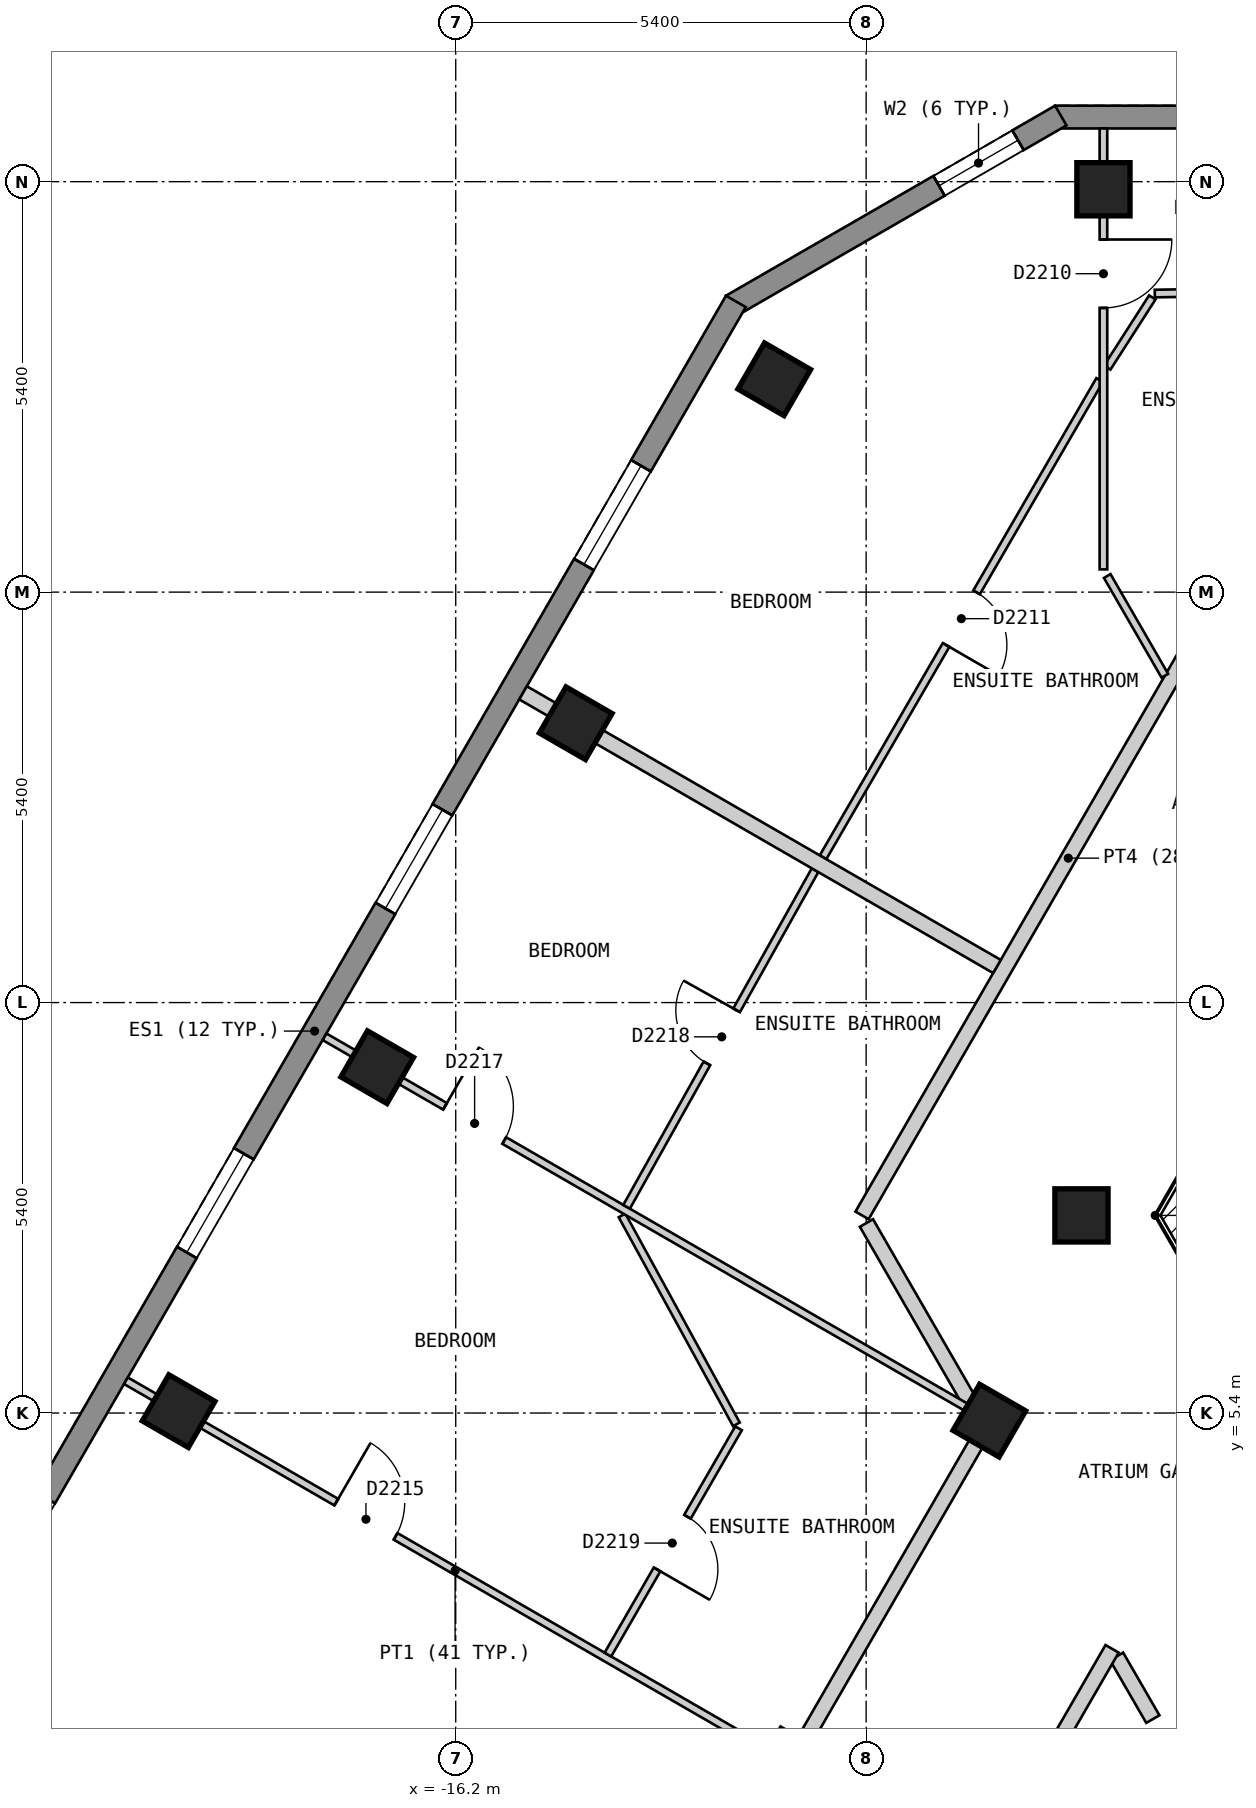
"""IFC4 building model, lengths in metres.
Left out: names, types, materials, properties, quantities, classifications, styles, units other than length and angle.
Written with IfcOpenShell. Run it as: python <this file> out.ifc"""

import sys

from ifc_helpers import new_model, si_unit, direction, frame, frame_2d, origin, origin_2d, place, context, subcontext, project, spatial, polyline, rectangle, outline, extrude, element, fill, save


model = new_model("IFC4")
c1 = context("Model", 3, precision=1e-05, world=origin(), true_north=direction((0.0, 1.0)))
c2 = subcontext(c1, "Body", "Model", "MODEL_VIEW")
j1 = project(units=[si_unit("LENGTHUNIT", "METRE"), si_unit("PLANEANGLEUNIT", "RADIAN")], contexts=[c1])
p1 = place(None, origin())
s1 = spatial("IfcSite", under=j1, at=p1, CompositionType="ELEMENT")
p2 = place(p1, origin())
s2 = spatial("IfcBuilding", under=s1, at=p2, CompositionType="ELEMENT")
p3 = place(p2, frame((0.0, 0.0, 235.8)))
s3 = spatial("IfcBuildingStorey", under=s2, at=p3, CompositionType="ELEMENT", Elevation=235.8)
for number, where, z_axis, x_axis in (
    (1, (-7.678, 21.5, 0.0), (0.0, 0.0, 1.0), (-1.0, 0.0, 0.0)),
    (2, (-12.009, 19.0, 0.0), (0.0, 0.0, 1.0), (-0.5, -0.866, 0.0)),
    (3, (-14.621, 14.475, 0.0), (0.0, 0.0, 1.0), (-0.5, -0.866, 0.0)),
    (4, (-17.233, 9.95, 0.0), (0.0, 0.0, 1.0), (-0.5, -0.866, 0.0)),
    (5, (-19.846, 5.425, 0.0), (0.0, 0.0, 1.0), (-0.5, -0.866, 0.0)),
    (6, (-7.967, 8.0, 0.0), (0.0, 0.0, 1.0), (1.0, 0.0, 0.0)),
    (7, (-9.179, 5.3, 0.0), (0.0, 0.0, 1.0), (-0.5, -0.866, 0.0)),
    (8, (-11.792, 0.775, 0.0), (0.0, 0.0, 1.0), (-0.5, -0.866, 0.0)),
):
    element("IfcColumn", number, at=place(p3, frame(where, z_axis=z_axis, x_axis=x_axis)), inside=s3, PredefinedType="COLUMN", context=c2, shape_type="SweptSolid", body=[
        extrude(rectangle(XDim=0.7, YDim=0.7, at=origin_2d()), origin(), (0.0, 0.0, 1.0), 3.0),
    ])
p4 = place(p3, frame((8.314, 22.45, 0.0), z_axis=(0.0, 0.0, 1.0), x_axis=(-1.0, 0.0, 0.0)))
e9 = element("IfcWall", 9, at=p4, inside=s3, PredefinedType="SOLIDWALL", context=c2, shape_type="SweptSolid", body=[
    extrude(outline(polyline([(0.0, -0.15), (16.628, -0.15), (16.548, 0.15), (0.08, 0.15), (0.0, -0.15)])), origin(), (0.0, 0.0, 1.0), 2.7),
])
p5 = place(p4, frame((2.444, 0.0, 0.15)))
e10 = element("IfcOpeningElement", 10, at=p5, cuts=e9, PredefinedType="OPENING", context=c2, shape_type="SweptSolid", body=[
    extrude(rectangle(XDim=1.5, YDim=2.1, at=frame_2d((0.75, 1.05))), frame((0.0, 0.16, 0.0), z_axis=(0.0, -1.0, 0.0), x_axis=(1.0, 0.0, 0.0)), (0.0, 0.0, 1.0), 0.32),
])
p6 = place(p4, frame((7.564, 0.0, 0.15)))
e11 = element("IfcOpeningElement", 11, at=p6, cuts=e9, PredefinedType="OPENING", context=c2, shape_type="SweptSolid", body=[
    extrude(rectangle(XDim=1.5, YDim=2.1, at=frame_2d((0.75, 1.05))), frame((0.0, 0.16, 0.0), z_axis=(0.0, -1.0, 0.0), x_axis=(1.0, 0.0, 0.0)), (0.0, 0.0, 1.0), 0.32),
])
p7 = place(p4, frame((12.683, 0.0, 0.15)))
e12 = element("IfcOpeningElement", 12, at=p7, cuts=e9, PredefinedType="OPENING", context=c2, shape_type="SweptSolid", body=[
    extrude(rectangle(XDim=1.5, YDim=2.1, at=frame_2d((0.75, 1.05))), frame((0.0, 0.16, 0.0), z_axis=(0.0, -1.0, 0.0), x_axis=(1.0, 0.0, 0.0)), (0.0, 0.0, 1.0), 0.32),
])
p8 = place(p3, frame((-8.239, 22.47, 0.0), z_axis=(0.0, 0.0, 1.0), x_axis=(-0.866022959057, -0.500004234368, 0.0)))
e13 = element("IfcWall", 13, at=p8, inside=s3, PredefinedType="SOLIDWALL", context=c2, shape_type="SweptSolid", body=[
    extrude(outline(polyline([(0.0, -0.15), (5.0, -0.15), (4.92, 0.15), (0.08, 0.15), (0.0, -0.15)])), origin(), (0.0, 0.0, 1.0), 2.7),
])
p9 = place(p8, frame((0.65, 0.0, 0.15)))
e14 = element("IfcOpeningElement", 14, at=p9, cuts=e13, PredefinedType="OPENING", context=c2, shape_type="SweptSolid", body=[
    extrude(rectangle(XDim=1.2, YDim=2.1, at=frame_2d((0.6, 1.05))), frame((0.0, 0.16, 0.0), z_axis=(0.0, -1.0, 0.0), x_axis=(1.0, 0.0, 0.0)), (0.0, 0.0, 1.0), 0.32),
])
p10 = place(p3, frame((-12.514, 20.025, 0.0), z_axis=(0.0, 0.0, 1.0), x_axis=(-0.500003656944, -0.866023292436, 0.0)))
e15 = element("IfcWall", 15, at=p10, inside=s3, PredefinedType="SOLIDWALL", context=c2, shape_type="SweptSolid", body=[
    extrude(outline(polyline([(0.0, -0.15), (22.17, -0.15), (22.09, 0.15), (0.08, 0.15), (0.0, -0.15)])), origin(), (0.0, 0.0, 1.0), 2.7),
])
p11 = place(p10, frame((2.497, 0.0, 0.15)))
e16 = element("IfcOpeningElement", 16, at=p11, cuts=e15, PredefinedType="OPENING", context=c2, shape_type="SweptSolid", body=[
    extrude(rectangle(XDim=1.5, YDim=2.1, at=frame_2d((0.75, 1.05))), frame((0.0, 0.16, 0.0), z_axis=(0.0, -1.0, 0.0), x_axis=(1.0, 0.0, 0.0)), (0.0, 0.0, 1.0), 0.32),
])
p12 = place(p10, frame((7.722, 0.0, 0.15)))
e17 = element("IfcOpeningElement", 17, at=p12, cuts=e15, PredefinedType="OPENING", context=c2, shape_type="SweptSolid", body=[
    extrude(rectangle(XDim=1.5, YDim=2.1, at=frame_2d((0.75, 1.05))), frame((0.0, 0.16, 0.0), z_axis=(0.0, -1.0, 0.0), x_axis=(1.0, 0.0, 0.0)), (0.0, 0.0, 1.0), 0.32),
])
p13 = place(p10, frame((12.948, 0.0, 0.15)))
e18 = element("IfcOpeningElement", 18, at=p13, cuts=e15, PredefinedType="OPENING", context=c2, shape_type="SweptSolid", body=[
    extrude(rectangle(XDim=1.5, YDim=2.1, at=frame_2d((0.75, 1.05))), frame((0.0, 0.16, 0.0), z_axis=(0.0, -1.0, 0.0), x_axis=(1.0, 0.0, 0.0)), (0.0, 0.0, 1.0), 0.32),
])
p14 = place(p10, frame((18.173, 0.0, 0.15)))
e19 = element("IfcOpeningElement", 19, at=p14, cuts=e15, PredefinedType="OPENING", context=c2, shape_type="SweptSolid", body=[
    extrude(rectangle(XDim=1.5, YDim=2.1, at=frame_2d((0.75, 1.05))), frame((0.0, 0.16, 0.0), z_axis=(0.0, -1.0, 0.0), x_axis=(1.0, 0.0, 0.0)), (0.0, 0.0, 1.0), 0.32),
])
p15 = place(p3, frame((-10.796, 7.9, 0.0), z_axis=(0.0, 0.0, 1.0), x_axis=(0.499674397761, -0.866213308731, 0.0)))
e20 = element("IfcWall", 20, at=p15, inside=s3, PredefinedType="PARTITIONING", context=c2, shape_type="SweptSolid", body=[
    extrude(rectangle(XDim=2.785, YDim=0.2, at=frame_2d((1.393, 0.0))), origin(), (0.0, 0.0, 1.0), 2.7),
])
p16 = place(p3, frame((-7.505, 2.198, 0.0), z_axis=(0.0, 0.0, 1.0), x_axis=(0.500409926597, -0.865788603161, 0.0)))
e21 = element("IfcWall", 21, at=p16, inside=s3, PredefinedType="PARTITIONING", context=c2, shape_type="SweptSolid", body=[
    extrude(rectangle(XDim=0.953, YDim=0.2, at=frame_2d((0.477, 0.0))), origin(), (0.0, 0.0, 1.0), 2.7),
])
p17 = place(p3, frame((-9.815, -1.6, 0.0), z_axis=(0.0, 0.0, 1.0), x_axis=(0.500058909736, 0.865991389561, 0.0)))
e22 = element("IfcWall", 22, at=p17, inside=s3, PredefinedType="PARTITIONING", context=c2, shape_type="SweptSolid", body=[
    extrude(rectangle(XDim=4.501, YDim=0.2, at=frame_2d((2.251, 0.0))), origin(), (0.0, 0.0, 1.0), 2.7),
])
p18 = place(p17, frame((1.801, 0.0, 0.0)))
e23 = element("IfcOpeningElement", 23, at=p18, cuts=e22, PredefinedType="OPENING", context=c2, shape_type="SweptSolid", body=[
    extrude(rectangle(XDim=0.9, YDim=2.1, at=frame_2d((0.45, 1.05))), frame((0.0, 0.11, 0.0), z_axis=(0.0, -1.0, 0.0), x_axis=(1.0, 0.0, 0.0)), (0.0, 0.0, 1.0), 0.22),
])
p19 = place(p3, frame((-13.106, -1.5, 0.0), z_axis=(0.0, 0.0, 1.0), x_axis=(0.500025705601, 0.86601056214, 0.0)))
e24 = element("IfcWall", 24, at=p19, inside=s3, PredefinedType="PARTITIONING", context=c2, shape_type="SweptSolid", body=[
    extrude(rectangle(XDim=7.735, YDim=0.2, at=frame_2d((3.868, 0.0))), origin(), (0.0, 0.0, 1.0), 2.7),
])
p20 = place(p3, frame((-10.854, 8.0, 0.0), z_axis=(0.0, 0.0, 1.0), x_axis=(0.499997637144, 0.866026767976, 0.0)))
e25 = element("IfcWall", 25, at=p20, inside=s3, PredefinedType="PARTITIONING", context=c2, shape_type="SweptSolid", body=[
    extrude(rectangle(XDim=10.854, YDim=0.2, at=frame_2d((5.427, 0.0))), origin(), (0.0, 0.0, 1.0), 2.7),
])
p21 = place(p3, frame((-7.628, 16.412, 0.0), z_axis=(0.0, 0.0, 1.0), x_axis=(0.500159472144, -0.86593331292, 0.0)))
e26 = element("IfcWall", 26, at=p21, inside=s3, PredefinedType="PARTITIONING", context=c2, shape_type="SweptSolid", body=[
    extrude(rectangle(XDim=1.515, YDim=0.1, at=frame_2d((0.758, 0.0))), origin(), (0.0, 0.0, 1.0), 2.7),
])
p22 = place(p3, frame((-14.012, 8.0, 0.0), z_axis=(0.0, 0.0, 1.0), x_axis=(0.480183343847, -0.877168145963, 0.0)))
e27 = element("IfcWall", 27, at=p22, inside=s3, PredefinedType="PARTITIONING", context=c2, shape_type="SweptSolid", body=[
    extrude(rectangle(XDim=3.134, YDim=0.1, at=frame_2d((1.567, 0.0))), origin(), (0.0, 0.0, 1.0), 2.7),
])
p23 = place(p3, frame((-20.539, 5.825, 0.0), z_axis=(0.0, 0.0, 1.0), x_axis=(0.866089650643, -0.499888704662, 0.0)))
e28 = element("IfcWall", 28, at=p23, inside=s3, PredefinedType="PARTITIONING", context=c2, shape_type="SweptSolid", body=[
    extrude(rectangle(XDim=10.0, YDim=0.1, at=frame_2d((5.0, 0.0))), origin(), (0.0, 0.0, 1.0), 2.7),
])
p24 = place(p23, frame((3.196, 0.0, 0.0)))
e29 = element("IfcOpeningElement", 29, at=p24, cuts=e28, PredefinedType="OPENING", context=c2, shape_type="SweptSolid", body=[
    extrude(rectangle(XDim=0.9, YDim=2.1, at=frame_2d((0.45, 1.05))), frame((0.0, 0.06, 0.0), z_axis=(0.0, -1.0, 0.0), x_axis=(1.0, 0.0, 0.0)), (0.0, 0.0, 1.0), 0.12),
])
p25 = place(p3, frame((-17.926, 10.35, 0.0), z_axis=(0.0, 0.0, 1.0), x_axis=(0.866018411306, -0.500012111133, 0.0)))
e30 = element("IfcWall", 30, at=p25, inside=s3, PredefinedType="PARTITIONING", context=c2, shape_type="SweptSolid", body=[
    extrude(rectangle(XDim=9.898, YDim=0.1, at=frame_2d((4.949, 0.0))), origin(), (0.0, 0.0, 1.0), 2.7),
])
p26 = place(p25, frame((1.83, 0.0, 0.0)))
e31 = element("IfcOpeningElement", 31, at=p26, cuts=e30, PredefinedType="OPENING", context=c2, shape_type="SweptSolid", body=[
    extrude(rectangle(XDim=0.9, YDim=2.1, at=frame_2d((0.45, 1.05))), frame((0.0, 0.06, 0.0), z_axis=(0.0, -1.0, 0.0), x_axis=(1.0, 0.0, 0.0)), (0.0, 0.0, 1.0), 0.12),
])
p27 = place(p3, frame((-7.628, 19.154, 0.0), z_axis=(0.0, 0.0, 1.0), x_axis=(0.540600102017, 0.841279697663, 0.0)))
e32 = element("IfcWall", 32, at=p27, inside=s3, PredefinedType="PARTITIONING", context=c2, shape_type="SweptSolid", body=[
    extrude(rectangle(XDim=1.097, YDim=0.1, at=frame_2d((0.548, 0.0))), origin(), (0.0, 0.0, 1.0), 2.7),
])
p28 = place(p3, frame((-14.198, 2.222, 0.0), z_axis=(0.0, 0.0, 1.0), x_axis=(0.500042121486, 0.866001083567, 0.0)))
e33 = element("IfcWall", 33, at=p28, inside=s3, PredefinedType="PARTITIONING", context=c2, shape_type="SweptSolid", body=[
    extrude(rectangle(XDim=3.438, YDim=0.1, at=frame_2d((1.719, 0.0))), origin(), (0.0, 0.0, 1.0), 2.7),
])
p29 = place(p28, frame((1.294, 0.0, 0.0)))
e34 = element("IfcOpeningElement", 34, at=p29, cuts=e33, PredefinedType="OPENING", context=c2, shape_type="SweptSolid", body=[
    extrude(rectangle(XDim=0.8, YDim=2.1, at=frame_2d((0.4, 1.05))), frame((0.0, 0.06, 0.0), z_axis=(0.0, -1.0, 0.0), x_axis=(1.0, 0.0, 0.0)), (0.0, 0.0, 1.0), 0.12),
])
p30 = place(p3, frame((-11.367, 12.712, 0.0), z_axis=(0.0, 0.0, 1.0), x_axis=(0.501473866443, 0.865172792727, 0.0)))
e35 = element("IfcWall", 35, at=p30, inside=s3, PredefinedType="PARTITIONING", context=c2, shape_type="SweptSolid", body=[
    extrude(rectangle(XDim=7.256, YDim=0.1, at=frame_2d((3.628, 0.0))), origin(), (0.0, 0.0, 1.0), 2.7),
])
p31 = place(p30, frame((3.228, 0.0, 0.0)))
e36 = element("IfcOpeningElement", 36, at=p31, cuts=e35, PredefinedType="OPENING", context=c2, shape_type="SweptSolid", body=[
    extrude(rectangle(XDim=0.8, YDim=2.1, at=frame_2d((0.4, 1.05))), frame((0.0, 0.06, 0.0), z_axis=(0.0, -1.0, 0.0), x_axis=(1.0, 0.0, 0.0)), (0.0, 0.0, 1.0), 0.12),
])
p32 = place(p3, frame((-13.952, 8.113, 0.0), z_axis=(0.0, 0.0, 1.0), x_axis=(0.488568218554, 0.872525699231, 0.0)))
e37 = element("IfcWall", 37, at=p32, inside=s3, PredefinedType="PARTITIONING", context=c2, shape_type="SweptSolid", body=[
    extrude(rectangle(XDim=5.076, YDim=0.1, at=frame_2d((2.538, 0.0))), origin(), (0.0, 0.0, 1.0), 2.7),
])
p33 = place(p32, frame((2.163, 0.0, 0.0)))
e38 = element("IfcOpeningElement", 38, at=p33, cuts=e37, PredefinedType="OPENING", context=c2, shape_type="SweptSolid", body=[
    extrude(rectangle(XDim=0.8, YDim=2.1, at=frame_2d((0.4, 1.05))), frame((0.0, 0.06, 0.0), z_axis=(0.0, -1.0, 0.0), x_axis=(1.0, 0.0, 0.0)), (0.0, 0.0, 1.0), 0.12),
])
p34 = place(p3, frame((-7.678, 16.499, 0.0), z_axis=(0.0, 0.0, 1.0), x_axis=(0.0, 1.0, 0.0)))
e39 = element("IfcWall", 39, at=p34, inside=s3, PredefinedType="PARTITIONING", context=c2, shape_type="SweptSolid", body=[
    extrude(rectangle(XDim=5.801, YDim=0.1, at=frame_2d((2.9, 0.0))), origin(), (0.0, 0.0, 1.0), 2.7),
])
p35 = place(p34, frame((3.44, 0.0, 0.0)))
e40 = element("IfcOpeningElement", 40, at=p35, cuts=e39, PredefinedType="OPENING", context=c2, shape_type="SweptSolid", body=[
    extrude(rectangle(XDim=0.9, YDim=2.1, at=frame_2d((0.45, 1.05))), frame((0.0, 0.06, 0.0), z_axis=(0.0, -1.0, 0.0), x_axis=(1.0, 0.0, 0.0)), (0.0, 0.0, 1.0), 0.12),
])
p36 = place(p3, frame((-7.002, 20.128, 0.0), z_axis=(0.0, 0.0, 1.0), x_axis=(0.999868634558, 0.016208443081, 0.0)))
e41 = element("IfcWall", 41, at=p36, inside=s3, PredefinedType="PARTITIONING", context=c2, shape_type="SweptSolid", body=[
    extrude(rectangle(XDim=4.443, YDim=0.1, at=frame_2d((2.222, 0.0))), origin(), (0.0, 0.0, 1.0), 2.7),
])
p37 = place(p36, frame((1.475, 0.0, 0.0)))
e42 = element("IfcOpeningElement", 42, at=p37, cuts=e41, PredefinedType="OPENING", context=c2, shape_type="SweptSolid", body=[
    extrude(rectangle(XDim=0.8, YDim=2.1, at=frame_2d((0.4, 1.05))), frame((0.0, 0.06, 0.0), z_axis=(0.0, -1.0, 0.0), x_axis=(1.0, 0.0, 0.0)), (0.0, 0.0, 1.0), 0.12),
])
p38 = place(p3, frame((-15.314, 14.875, 0.0), z_axis=(0.0, 0.0, 1.0), x_axis=(0.866001485781, -0.500041424909, 0.0)))
e43 = element("IfcWall", 43, at=p38, inside=s3, PredefinedType="PARTITIONING", context=c2, shape_type="SweptSolid", body=[
    extrude(rectangle(XDim=7.2, YDim=0.2, at=frame_2d((3.6, 0.0))), origin(), (0.0, 0.0, 1.0), 2.7),
])
p39 = place(p9, origin())
e44 = element("IfcWindow", 44, at=p39, inside=s3, PartitioningType="SINGLE_PANEL", PredefinedType="WINDOW", context=c2, shape_type="SweptSolid", body=[
    extrude(rectangle(XDim=1.2, YDim=2.1, at=frame_2d((0.6, 1.05))), frame((0.0, 0.03, 0.0), z_axis=(0.0, -1.0, 0.0), x_axis=(1.0, 0.0, 0.0)), (0.0, 0.0, 1.0), 0.06),
])
fill(e14, e44)
p40 = place(p11, origin())
e45 = element("IfcWindow", 45, at=p40, inside=s3, PartitioningType="SINGLE_PANEL", PredefinedType="WINDOW", context=c2, shape_type="SweptSolid", body=[
    extrude(rectangle(XDim=1.5, YDim=2.1, at=frame_2d((0.75, 1.05))), frame((0.0, 0.03, 0.0), z_axis=(0.0, -1.0, 0.0), x_axis=(1.0, 0.0, 0.0)), (0.0, 0.0, 1.0), 0.06),
])
fill(e16, e45)
p41 = place(p12, origin())
e46 = element("IfcWindow", 46, at=p41, inside=s3, PartitioningType="SINGLE_PANEL", PredefinedType="WINDOW", context=c2, shape_type="SweptSolid", body=[
    extrude(rectangle(XDim=1.5, YDim=2.1, at=frame_2d((0.75, 1.05))), frame((0.0, 0.03, 0.0), z_axis=(0.0, -1.0, 0.0), x_axis=(1.0, 0.0, 0.0)), (0.0, 0.0, 1.0), 0.06),
])
fill(e17, e46)
p42 = place(p13, origin())
e47 = element("IfcWindow", 47, at=p42, inside=s3, PartitioningType="SINGLE_PANEL", PredefinedType="WINDOW", context=c2, shape_type="SweptSolid", body=[
    extrude(rectangle(XDim=1.5, YDim=2.1, at=frame_2d((0.75, 1.05))), frame((0.0, 0.03, 0.0), z_axis=(0.0, -1.0, 0.0), x_axis=(1.0, 0.0, 0.0)), (0.0, 0.0, 1.0), 0.06),
])
fill(e18, e47)
p43 = place(p35, origin())
e48 = element("IfcDoor", 48, at=p43, inside=s3, OperationType="SINGLE_SWING_RIGHT", PredefinedType="DOOR", context=c2, shape_type="SweptSolid", body=[
    extrude(rectangle(XDim=0.9, YDim=2.1, at=frame_2d((0.45, 1.05))), frame((0.0, 0.025, 0.0), z_axis=(0.0, -1.0, 0.0), x_axis=(1.0, 0.0, 0.0)), (0.0, 0.0, 1.0), 0.05),
])
fill(e40, e48)
p44 = place(p31, origin())
e49 = element("IfcDoor", 49, at=p44, inside=s3, OperationType="SINGLE_SWING_LEFT", PredefinedType="DOOR", context=c2, shape_type="SweptSolid", body=[
    extrude(rectangle(XDim=0.8, YDim=2.1, at=frame_2d((0.4, 1.05))), frame((0.0, 0.025, 0.0), z_axis=(0.0, -1.0, 0.0), x_axis=(1.0, 0.0, 0.0)), (0.0, 0.0, 1.0), 0.05),
])
fill(e36, e49)
p45 = place(p24, origin())
e50 = element("IfcDoor", 50, at=p45, inside=s3, OperationType="SINGLE_SWING_LEFT", PredefinedType="DOOR", context=c2, shape_type="SweptSolid", body=[
    extrude(rectangle(XDim=0.9, YDim=2.1, at=frame_2d((0.45, 1.05))), frame((0.0, 0.025, 0.0), z_axis=(0.0, -1.0, 0.0), x_axis=(1.0, 0.0, 0.0)), (0.0, 0.0, 1.0), 0.05),
])
fill(e29, e50)
p46 = place(p26, origin())
e51 = element("IfcDoor", 51, at=p46, inside=s3, OperationType="SINGLE_SWING_LEFT", PredefinedType="DOOR", context=c2, shape_type="SweptSolid", body=[
    extrude(rectangle(XDim=0.9, YDim=2.1, at=frame_2d((0.45, 1.05))), frame((0.0, 0.025, 0.0), z_axis=(0.0, -1.0, 0.0), x_axis=(1.0, 0.0, 0.0)), (0.0, 0.0, 1.0), 0.05),
])
fill(e31, e51)
p47 = place(p33, origin())
e52 = element("IfcDoor", 52, at=p47, inside=s3, OperationType="SINGLE_SWING_RIGHT", PredefinedType="DOOR", context=c2, shape_type="SweptSolid", body=[
    extrude(rectangle(XDim=0.8, YDim=2.1, at=frame_2d((0.4, 1.05))), frame((0.0, 0.025, 0.0), z_axis=(0.0, -1.0, 0.0), x_axis=(1.0, 0.0, 0.0)), (0.0, 0.0, 1.0), 0.05),
])
fill(e38, e52)
p48 = place(p29, origin())
e53 = element("IfcDoor", 53, at=p48, inside=s3, OperationType="SINGLE_SWING_LEFT", PredefinedType="DOOR", context=c2, shape_type="SweptSolid", body=[
    extrude(rectangle(XDim=0.8, YDim=2.1, at=frame_2d((0.4, 1.05))), frame((0.0, 0.025, 0.0), z_axis=(0.0, -1.0, 0.0), x_axis=(1.0, 0.0, 0.0)), (0.0, 0.0, 1.0), 0.05),
])
fill(e34, e53)
save(model, sys.argv[1])
